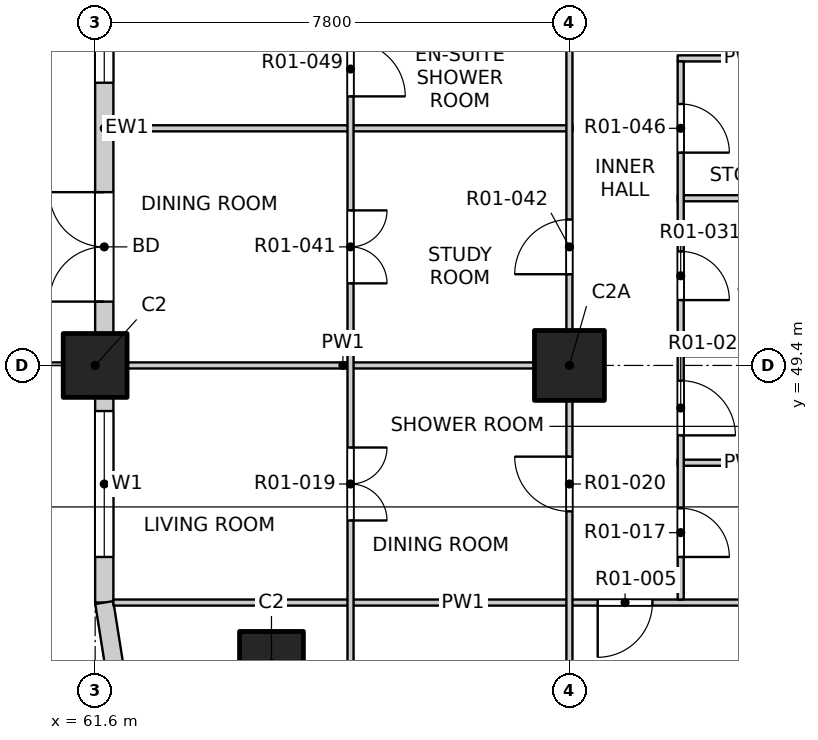
"""IFC4 building model, lengths in metres.
Left out: names, types, materials, properties, quantities, classifications, styles, units other than length and angle.
Written with IfcOpenShell. Run it as: python <this file> out.ifc"""

import sys

from ifc_helpers import new_model, si_unit, direction, frame, frame_2d, origin, origin_2d, place, context, subcontext, project, spatial, rectangle, extrude, element, fill, save


model = new_model("IFC4")
c1 = context("Model", 3, precision=1e-05, world=origin(), true_north=direction((0.0, 1.0)))
c2 = subcontext(c1, "Body", "Model", "MODEL_VIEW")
j1 = project(units=[si_unit("LENGTHUNIT", "METRE"), si_unit("PLANEANGLEUNIT", "RADIAN")], contexts=[c1])
p1 = place(None, origin())
s1 = spatial("IfcSite", under=j1, at=p1, CompositionType="ELEMENT")
p2 = place(p1, origin())
s2 = spatial("IfcBuilding", under=s1, at=p2, CompositionType="ELEMENT")
p3 = place(p2, frame((0.0, 0.0, 26.3)))
s3 = spatial("IfcBuildingStorey", under=s2, at=p3, CompositionType="ELEMENT", Elevation=26.3)
for number, where, z_axis, x_axis in (
    (1, (64.5, 44.5, -0.25), (0.0, 0.0, 1.0), (1.0, 0.0, 0.0)),
    (2, (61.6, 49.4, -0.25), (0.0, 0.0, 1.0), (1.0, 0.0, 0.0)),
):
    element("IfcColumn", number, at=place(p3, frame(where, z_axis=z_axis, x_axis=x_axis)), inside=s3, PredefinedType="COLUMN", context=c2, shape_type="SweptSolid", body=[
        extrude(rectangle(XDim=1.05, YDim=1.05, at=origin_2d()), origin(), (0.0, 0.0, 1.0), 3.4),
    ])
p4 = place(p3, frame((69.4, 49.4, -0.25), z_axis=(0.0, 0.0, 1.0), x_axis=(1.0, 0.0, 0.0)))
e3 = element("IfcColumn", 3, at=p4, inside=s3, PredefinedType="COLUMN", context=c2, shape_type="SweptSolid", body=[
    extrude(rectangle(XDim=1.15, YDim=1.15, at=origin_2d()), origin(), (0.0, 0.0, 1.0), 3.4),
])
p5 = place(p3, frame((61.75, 45.5, 0.0), z_axis=(0.0, 0.0, 1.0), x_axis=(0.0, 1.0, 0.0)))
e4 = element("IfcWall", 4, at=p5, inside=s3, PredefinedType="SOLIDWALL", context=c2, shape_type="SweptSolid", body=[
    extrude(rectangle(XDim=3.375, YDim=0.3, at=frame_2d((1.688, 0.0))), origin(), (0.0, 0.0, 1.0), 2.7),
])
p6 = place(p5, frame((0.75, 0.0, 0.9)))
e5 = element("IfcOpeningElement", 5, at=p6, cuts=e4, PredefinedType="OPENING", context=c2, shape_type="SweptSolid", body=[
    extrude(rectangle(XDim=2.4, YDim=1.8, at=frame_2d((1.2, 0.9))), frame((0.0, 0.16, 0.0), z_axis=(0.0, -1.0, 0.0), x_axis=(1.0, 0.0, 0.0)), (0.0, 0.0, 1.0), 0.32),
])
p7 = place(p3, frame((61.75, 49.925, 0.0), z_axis=(0.0, 0.0, 1.0), x_axis=(0.0, 1.0, 0.0)))
e6 = element("IfcWall", 6, at=p7, inside=s3, PredefinedType="SOLIDWALL", context=c2, shape_type="SweptSolid", body=[
    extrude(rectangle(XDim=6.75, YDim=0.3, at=frame_2d((3.375, 0.0))), origin(), (0.0, 0.0, 1.0), 2.7),
])
p8 = place(p7, frame((0.525, 0.0, 0.0)))
e7 = element("IfcOpeningElement", 7, at=p8, cuts=e6, PredefinedType="OPENING", context=c2, shape_type="SweptSolid", body=[
    extrude(rectangle(XDim=1.8, YDim=2.4, at=frame_2d((0.9, 1.2))), frame((0.0, 0.16, 0.0), z_axis=(0.0, -1.0, 0.0), x_axis=(1.0, 0.0, 0.0)), (0.0, 0.0, 1.0), 0.32),
])
p9 = place(p7, frame((4.125, 0.0, 0.9)))
e8 = element("IfcOpeningElement", 8, at=p9, cuts=e6, PredefinedType="OPENING", context=c2, shape_type="SweptSolid", body=[
    extrude(rectangle(XDim=2.4, YDim=1.8, at=frame_2d((1.2, 0.9))), frame((0.0, 0.16, 0.0), z_axis=(0.0, -1.0, 0.0), x_axis=(1.0, 0.0, 0.0)), (0.0, 0.0, 1.0), 0.32),
])
p10 = place(p3, frame((61.75, 45.5, 0.0), z_axis=(0.0, 0.0, 1.0), x_axis=(0.156496880861, -0.987678452879, 0.0)))
e9 = element("IfcWall", 9, at=p10, inside=s3, PredefinedType="SOLIDWALL", context=c2, shape_type="SweptSolid", body=[
    extrude(rectangle(XDim=1.173, YDim=0.3, at=frame_2d((0.586, 0.0))), origin(), (0.0, 0.0, 1.0), 2.7),
])
p11 = place(p3, frame((61.9, 45.5, 0.0), z_axis=(0.0, 0.0, 1.0), x_axis=(1.0, 0.0, 0.0)))
e10 = element("IfcWall", 10, at=p11, inside=s3, PredefinedType="PARTITIONING", context=c2, shape_type="SweptSolid", body=[
    extrude(rectangle(XDim=11.5, YDim=0.1, at=frame_2d((5.75, 0.0))), origin(), (0.0, 0.0, 1.0), 3.15),
])
p12 = place(p11, frame((7.965, 0.0, 0.0)))
e11 = element("IfcOpeningElement", 11, at=p12, cuts=e10, PredefinedType="OPENING", context=c2, shape_type="SweptSolid", body=[
    extrude(rectangle(XDim=0.9, YDim=2.1, at=frame_2d((0.45, 1.05))), frame((0.0, 0.06, 0.0), z_axis=(0.0, -1.0, 0.0), x_axis=(1.0, 0.0, 0.0)), (0.0, 0.0, 1.0), 0.12),
])
p13 = place(p3, frame((71.18, 47.8, 0.0), z_axis=(0.0, 0.0, 1.0), x_axis=(1.0, 0.0, 0.0)))
e12 = element("IfcWall", 12, at=p13, inside=s3, PredefinedType="PARTITIONING", context=c2, shape_type="SweptSolid", body=[
    extrude(rectangle(XDim=2.22, YDim=0.1, at=frame_2d((1.11, 0.0))), origin(), (0.0, 0.0, 1.0), 3.15),
])
p14 = place(p3, frame((61.9, 49.4, 0.0), z_axis=(0.0, 0.0, 1.0), x_axis=(1.0, 0.0, 0.0)))
e13 = element("IfcWall", 13, at=p14, inside=s3, PredefinedType="PARTITIONING", context=c2, shape_type="SweptSolid", body=[
    extrude(rectangle(XDim=7.55, YDim=0.1, at=frame_2d((3.775, 0.0))), origin(), (0.0, 0.0, 1.0), 2.55),
])
for number, where, z_axis, x_axis in (
    (14, (71.18, 49.6, 0.0), (0.0, 0.0, 1.0), (1.0, 0.0, 0.0)),
    (15, (71.18, 52.15, 0.0), (0.0, 0.0, 1.0), (1.0, 0.0, 0.0)),
):
    element("IfcWall", number, at=place(p3, frame(where, z_axis=z_axis, x_axis=x_axis)), inside=s3, PredefinedType="PARTITIONING", context=c2, shape_type="SweptSolid", body=[
        extrude(rectangle(XDim=2.22, YDim=0.1, at=frame_2d((1.11, 0.0))), origin(), (0.0, 0.0, 1.0), 3.15),
    ])
p15 = place(p3, frame((61.9, 53.3, 0.0), z_axis=(0.0, 0.0, 1.0), x_axis=(1.0, 0.0, 0.0)))
e16 = element("IfcWall", 16, at=p15, inside=s3, PredefinedType="PARTITIONING", context=c2, shape_type="SweptSolid", body=[
    extrude(rectangle(XDim=7.55, YDim=0.1, at=frame_2d((3.775, 0.0))), origin(), (0.0, 0.0, 1.0), 3.15),
])
p16 = place(p3, frame((71.18, 54.45, 0.0), z_axis=(0.0, 0.0, 1.0), x_axis=(1.0, 0.0, 0.0)))
e17 = element("IfcWall", 17, at=p16, inside=s3, PredefinedType="PARTITIONING", context=c2, shape_type="SweptSolid", body=[
    extrude(rectangle(XDim=2.22, YDim=0.1, at=frame_2d((1.11, 0.0))), origin(), (0.0, 0.0, 1.0), 3.15),
])
p17 = place(p3, frame((65.8, 41.9, 0.0), z_axis=(0.0, 0.0, 1.0), x_axis=(0.0, 1.0, 0.0)))
e18 = element("IfcWall", 18, at=p17, inside=s3, PredefinedType="PARTITIONING", context=c2, shape_type="SweptSolid", body=[
    extrude(rectangle(XDim=19.1, YDim=0.1, at=frame_2d((9.55, 0.0))), origin(), (0.0, 0.0, 1.0), 3.15),
])
p18 = place(p17, frame((1.05, 0.0, 0.0)))
e19 = element("IfcOpeningElement", 19, at=p18, cuts=e18, PredefinedType="OPENING", context=c2, shape_type="SweptSolid", body=[
    extrude(rectangle(XDim=1.2, YDim=2.1, at=frame_2d((0.6, 1.05))), frame((0.0, 0.06, 0.0), z_axis=(0.0, -1.0, 0.0), x_axis=(1.0, 0.0, 0.0)), (0.0, 0.0, 1.0), 0.12),
])
p19 = place(p17, frame((4.95, 0.0, 0.0)))
e20 = element("IfcOpeningElement", 20, at=p19, cuts=e18, PredefinedType="OPENING", context=c2, shape_type="SweptSolid", body=[
    extrude(rectangle(XDim=1.2, YDim=2.1, at=frame_2d((0.6, 1.05))), frame((0.0, 0.06, 0.0), z_axis=(0.0, -1.0, 0.0), x_axis=(1.0, 0.0, 0.0)), (0.0, 0.0, 1.0), 0.12),
])
p20 = place(p17, frame((8.85, 0.0, 0.0)))
e21 = element("IfcOpeningElement", 21, at=p20, cuts=e18, PredefinedType="OPENING", context=c2, shape_type="SweptSolid", body=[
    extrude(rectangle(XDim=1.2, YDim=2.1, at=frame_2d((0.6, 1.05))), frame((0.0, 0.06, 0.0), z_axis=(0.0, -1.0, 0.0), x_axis=(1.0, 0.0, 0.0)), (0.0, 0.0, 1.0), 0.12),
])
p21 = place(p17, frame((11.925, 0.0, 0.0)))
e22 = element("IfcOpeningElement", 22, at=p21, cuts=e18, PredefinedType="OPENING", context=c2, shape_type="SweptSolid", body=[
    extrude(rectangle(XDim=0.9, YDim=2.1, at=frame_2d((0.45, 1.05))), frame((0.0, 0.06, 0.0), z_axis=(0.0, -1.0, 0.0), x_axis=(1.0, 0.0, 0.0)), (0.0, 0.0, 1.0), 0.12),
])
p22 = place(p17, frame((13.875, 0.0, 0.0)))
e23 = element("IfcOpeningElement", 23, at=p22, cuts=e18, PredefinedType="OPENING", context=c2, shape_type="SweptSolid", body=[
    extrude(rectangle(XDim=0.9, YDim=2.1, at=frame_2d((0.45, 1.05))), frame((0.0, 0.06, 0.0), z_axis=(0.0, -1.0, 0.0), x_axis=(1.0, 0.0, 0.0)), (0.0, 0.0, 1.0), 0.12),
])
p23 = place(p17, frame((15.825, 0.0, 0.0)))
e24 = element("IfcOpeningElement", 24, at=p23, cuts=e18, PredefinedType="OPENING", context=c2, shape_type="SweptSolid", body=[
    extrude(rectangle(XDim=0.9, YDim=2.1, at=frame_2d((0.45, 1.05))), frame((0.0, 0.06, 0.0), z_axis=(0.0, -1.0, 0.0), x_axis=(1.0, 0.0, 0.0)), (0.0, 0.0, 1.0), 0.12),
])
p24 = place(p17, frame((17.775, 0.0, 0.0)))
e25 = element("IfcOpeningElement", 25, at=p24, cuts=e18, PredefinedType="OPENING", context=c2, shape_type="SweptSolid", body=[
    extrude(rectangle(XDim=0.9, YDim=2.1, at=frame_2d((0.45, 1.05))), frame((0.0, 0.06, 0.0), z_axis=(0.0, -1.0, 0.0), x_axis=(1.0, 0.0, 0.0)), (0.0, 0.0, 1.0), 0.12),
])
p25 = place(p3, frame((69.4, 41.9, 0.0), z_axis=(0.0, 0.0, 1.0), x_axis=(0.0, 1.0, 0.0)))
e26 = element("IfcWall", 26, at=p25, inside=s3, PredefinedType="PARTITIONING", context=c2, shape_type="SweptSolid", body=[
    extrude(rectangle(XDim=7.5, YDim=0.1, at=frame_2d((3.75, 0.0))), origin(), (0.0, 0.0, 1.0), 2.55),
])
p26 = place(p25, frame((1.2, 0.0, 0.0)))
e27 = element("IfcOpeningElement", 27, at=p26, cuts=e26, PredefinedType="OPENING", context=c2, shape_type="SweptSolid", body=[
    extrude(rectangle(XDim=0.9, YDim=2.1, at=frame_2d((0.45, 1.05))), frame((0.0, 0.06, 0.0), z_axis=(0.0, -1.0, 0.0), x_axis=(1.0, 0.0, 0.0)), (0.0, 0.0, 1.0), 0.12),
])
p27 = place(p25, frame((5.1, 0.0, 0.0)))
e28 = element("IfcOpeningElement", 28, at=p27, cuts=e26, PredefinedType="OPENING", context=c2, shape_type="SweptSolid", body=[
    extrude(rectangle(XDim=0.9, YDim=2.1, at=frame_2d((0.45, 1.05))), frame((0.0, 0.06, 0.0), z_axis=(0.0, -1.0, 0.0), x_axis=(1.0, 0.0, 0.0)), (0.0, 0.0, 1.0), 0.12),
])
p28 = place(p3, frame((69.4, 49.4, 0.0), z_axis=(0.0, 0.0, 1.0), x_axis=(0.0, 1.0, 0.0)))
e29 = element("IfcWall", 29, at=p28, inside=s3, PredefinedType="PARTITIONING", context=c2, shape_type="SweptSolid", body=[
    extrude(rectangle(XDim=31.2, YDim=0.1, at=frame_2d((15.6, 0.0))), origin(), (0.0, 0.0, 1.0), 3.15),
])
p29 = place(p28, frame((1.5, 0.0, 0.0)))
e30 = element("IfcOpeningElement", 30, at=p29, cuts=e29, PredefinedType="OPENING", context=c2, shape_type="SweptSolid", body=[
    extrude(rectangle(XDim=0.9, YDim=2.1, at=frame_2d((0.45, 1.05))), frame((0.0, 0.06, 0.0), z_axis=(0.0, -1.0, 0.0), x_axis=(1.0, 0.0, 0.0)), (0.0, 0.0, 1.0), 0.12),
])
p30 = place(p28, frame((6.225, 0.0, 0.0)))
e31 = element("IfcOpeningElement", 31, at=p30, cuts=e29, PredefinedType="OPENING", context=c2, shape_type="SweptSolid", body=[
    extrude(rectangle(XDim=0.9, YDim=2.1, at=frame_2d((0.45, 1.05))), frame((0.0, 0.06, 0.0), z_axis=(0.0, -1.0, 0.0), x_axis=(1.0, 0.0, 0.0)), (0.0, 0.0, 1.0), 0.12),
])
p31 = place(p28, frame((10.275, 0.0, 0.0)))
e32 = element("IfcOpeningElement", 32, at=p31, cuts=e29, PredefinedType="OPENING", context=c2, shape_type="SweptSolid", body=[
    extrude(rectangle(XDim=0.9, YDim=2.1, at=frame_2d((0.45, 1.05))), frame((0.0, 0.06, 0.0), z_axis=(0.0, -1.0, 0.0), x_axis=(1.0, 0.0, 0.0)), (0.0, 0.0, 1.0), 0.12),
])
p32 = place(p28, frame((13.2, 0.0, 0.0)))
e33 = element("IfcOpeningElement", 33, at=p32, cuts=e29, PredefinedType="OPENING", context=c2, shape_type="SweptSolid", body=[
    extrude(rectangle(XDim=0.9, YDim=2.1, at=frame_2d((0.45, 1.05))), frame((0.0, 0.06, 0.0), z_axis=(0.0, -1.0, 0.0), x_axis=(1.0, 0.0, 0.0)), (0.0, 0.0, 1.0), 0.12),
])
p33 = place(p28, frame((18.075, 0.0, 0.0)))
e34 = element("IfcOpeningElement", 34, at=p33, cuts=e29, PredefinedType="OPENING", context=c2, shape_type="SweptSolid", body=[
    extrude(rectangle(XDim=0.9, YDim=2.1, at=frame_2d((0.45, 1.05))), frame((0.0, 0.06, 0.0), z_axis=(0.0, -1.0, 0.0), x_axis=(1.0, 0.0, 0.0)), (0.0, 0.0, 1.0), 0.12),
])
p34 = place(p28, frame((21.8, 0.0, 0.0)))
e35 = element("IfcOpeningElement", 35, at=p34, cuts=e29, PredefinedType="OPENING", context=c2, shape_type="SweptSolid", body=[
    extrude(rectangle(XDim=0.9, YDim=2.1, at=frame_2d((0.45, 1.05))), frame((0.0, 0.06, 0.0), z_axis=(0.0, -1.0, 0.0), x_axis=(1.0, 0.0, 0.0)), (0.0, 0.0, 1.0), 0.12),
])
p35 = place(p28, frame((24.9, 0.0, 0.0)))
e36 = element("IfcOpeningElement", 36, at=p35, cuts=e29, PredefinedType="OPENING", context=c2, shape_type="SweptSolid", body=[
    extrude(rectangle(XDim=0.9, YDim=2.1, at=frame_2d((0.45, 1.05))), frame((0.0, 0.06, 0.0), z_axis=(0.0, -1.0, 0.0), x_axis=(1.0, 0.0, 0.0)), (0.0, 0.0, 1.0), 0.12),
])
p36 = place(p28, frame((29.6, 0.0, 0.0)))
e37 = element("IfcOpeningElement", 37, at=p36, cuts=e29, PredefinedType="OPENING", context=c2, shape_type="SweptSolid", body=[
    extrude(rectangle(XDim=0.9, YDim=2.1, at=frame_2d((0.45, 1.05))), frame((0.0, 0.06, 0.0), z_axis=(0.0, -1.0, 0.0), x_axis=(1.0, 0.0, 0.0)), (0.0, 0.0, 1.0), 0.12),
])
p37 = place(p3, frame((71.23, 45.55, 0.0), z_axis=(0.0, 0.0, 1.0), x_axis=(0.0, 1.0, 0.0)))
e38 = element("IfcWall", 38, at=p37, inside=s3, PredefinedType="PARTITIONING", context=c2, shape_type="SweptSolid", body=[
    extrude(rectangle(XDim=8.85, YDim=0.1, at=frame_2d((4.425, 0.0))), origin(), (0.0, 0.0, 1.0), 3.15),
])
p38 = place(p37, frame((0.7, 0.0, 0.0)))
e39 = element("IfcOpeningElement", 39, at=p38, cuts=e38, PredefinedType="OPENING", context=c2, shape_type="SweptSolid", body=[
    extrude(rectangle(XDim=0.8, YDim=2.1, at=frame_2d((0.4, 1.05))), frame((0.0, 0.06, 0.0), z_axis=(0.0, -1.0, 0.0), x_axis=(1.0, 0.0, 0.0)), (0.0, 0.0, 1.0), 0.12),
])
p39 = place(p37, frame((2.7, 0.0, 0.0)))
e40 = element("IfcOpeningElement", 40, at=p39, cuts=e38, PredefinedType="OPENING", context=c2, shape_type="SweptSolid", body=[
    extrude(rectangle(XDim=0.9, YDim=2.1, at=frame_2d((0.45, 1.05))), frame((0.0, 0.06, 0.0), z_axis=(0.0, -1.0, 0.0), x_axis=(1.0, 0.0, 0.0)), (0.0, 0.0, 1.0), 0.12),
])
p40 = place(p37, frame((4.925, 0.0, 0.0)))
e41 = element("IfcOpeningElement", 41, at=p40, cuts=e38, PredefinedType="OPENING", context=c2, shape_type="SweptSolid", body=[
    extrude(rectangle(XDim=0.8, YDim=2.1, at=frame_2d((0.4, 1.05))), frame((0.0, 0.06, 0.0), z_axis=(0.0, -1.0, 0.0), x_axis=(1.0, 0.0, 0.0)), (0.0, 0.0, 1.0), 0.12),
])
p41 = place(p37, frame((7.35, 0.0, 0.0)))
e42 = element("IfcOpeningElement", 42, at=p41, cuts=e38, PredefinedType="OPENING", context=c2, shape_type="SweptSolid", body=[
    extrude(rectangle(XDim=0.8, YDim=2.1, at=frame_2d((0.4, 1.05))), frame((0.0, 0.06, 0.0), z_axis=(0.0, -1.0, 0.0), x_axis=(1.0, 0.0, 0.0)), (0.0, 0.0, 1.0), 0.12),
])
p42 = place(p6, origin())
e43 = element("IfcWindow", 43, at=p42, inside=s3, PartitioningType="DOUBLE_PANEL_VERTICAL", PredefinedType="WINDOW", context=c2, shape_type="SweptSolid", body=[
    extrude(rectangle(XDim=2.4, YDim=1.8, at=frame_2d((1.2, 0.9))), frame((0.0, 0.03, 0.0), z_axis=(0.0, -1.0, 0.0), x_axis=(1.0, 0.0, 0.0)), (0.0, 0.0, 1.0), 0.06),
])
fill(e5, e43)
p43 = place(p8, origin())
e44 = element("IfcDoor", 44, at=p43, inside=s3, OperationType="DOUBLE_DOOR_SINGLE_SWING", PredefinedType="DOOR", context=c2, shape_type="SweptSolid", body=[
    extrude(rectangle(XDim=1.8, YDim=2.4, at=frame_2d((0.9, 1.2))), frame((0.0, 0.025, 0.0), z_axis=(0.0, -1.0, 0.0), x_axis=(1.0, 0.0, 0.0)), (0.0, 0.0, 1.0), 0.05),
])
fill(e7, e44)
p44 = place(p9, origin())
e45 = element("IfcWindow", 45, at=p44, inside=s3, PartitioningType="DOUBLE_PANEL_VERTICAL", PredefinedType="WINDOW", context=c2, shape_type="SweptSolid", body=[
    extrude(rectangle(XDim=2.4, YDim=1.8, at=frame_2d((1.2, 0.9))), frame((0.0, 0.03, 0.0), z_axis=(0.0, -1.0, 0.0), x_axis=(1.0, 0.0, 0.0)), (0.0, 0.0, 1.0), 0.06),
])
fill(e8, e45)
p45 = place(p12, origin())
e46 = element("IfcDoor", 46, at=p45, inside=s3, OperationType="SINGLE_SWING_RIGHT", PredefinedType="DOOR", context=c2, shape_type="SweptSolid", body=[
    extrude(rectangle(XDim=0.9, YDim=2.1, at=frame_2d((0.45, 1.05))), frame((0.0, 0.025, 0.0), z_axis=(0.0, -1.0, 0.0), x_axis=(1.0, 0.0, 0.0)), (0.0, 0.0, 1.0), 0.05),
])
fill(e11, e46)
p46 = place(p38, origin())
e47 = element("IfcDoor", 47, at=p46, inside=s3, OperationType="SINGLE_SWING_RIGHT", PredefinedType="DOOR", context=c2, shape_type="SweptSolid", body=[
    extrude(rectangle(XDim=0.8, YDim=2.1, at=frame_2d((0.4, 1.05))), frame((0.0, 0.025, 0.0), z_axis=(0.0, -1.0, 0.0), x_axis=(1.0, 0.0, 0.0)), (0.0, 0.0, 1.0), 0.05),
])
fill(e39, e47)
p47 = place(p19, origin())
e48 = element("IfcDoor", 48, at=p47, inside=s3, OperationType="DOUBLE_DOOR_SINGLE_SWING", PredefinedType="DOOR", context=c2, shape_type="SweptSolid", body=[
    extrude(rectangle(XDim=1.2, YDim=2.1, at=frame_2d((0.6, 1.05))), frame((0.0, 0.025, 0.0), z_axis=(0.0, -1.0, 0.0), x_axis=(1.0, 0.0, 0.0)), (0.0, 0.0, 1.0), 0.05),
])
fill(e20, e48)
p48 = place(p27, origin())
e49 = element("IfcDoor", 49, at=p48, inside=s3, OperationType="SINGLE_SWING_RIGHT", PredefinedType="DOOR", context=c2, shape_type="SweptSolid", body=[
    extrude(rectangle(XDim=0.9, YDim=2.1, at=frame_2d((0.45, 1.05))), frame((0.0, 0.025, 0.0), z_axis=(0.0, -1.0, 0.0), x_axis=(1.0, 0.0, 0.0)), (0.0, 0.0, 1.0), 0.05),
])
fill(e28, e49)
p49 = place(p39, origin())
e50 = element("IfcDoor", 50, at=p49, inside=s3, OperationType="SINGLE_SWING_RIGHT", PredefinedType="DOOR", context=c2, shape_type="SweptSolid", body=[
    extrude(rectangle(XDim=0.9, YDim=2.1, at=frame_2d((0.45, 1.05))), frame((0.0, 0.025, 0.0), z_axis=(0.0, -1.0, 0.0), x_axis=(1.0, 0.0, 0.0)), (0.0, 0.0, 1.0), 0.05),
])
fill(e40, e50)
p50 = place(p40, origin())
e51 = element("IfcDoor", 51, at=p50, inside=s3, OperationType="SINGLE_SWING_RIGHT", PredefinedType="DOOR", context=c2, shape_type="SweptSolid", body=[
    extrude(rectangle(XDim=0.8, YDim=2.1, at=frame_2d((0.4, 1.05))), frame((0.0, 0.025, 0.0), z_axis=(0.0, -1.0, 0.0), x_axis=(1.0, 0.0, 0.0)), (0.0, 0.0, 1.0), 0.05),
])
fill(e41, e51)
p51 = place(p20, origin())
e52 = element("IfcDoor", 52, at=p51, inside=s3, OperationType="DOUBLE_DOOR_SINGLE_SWING", PredefinedType="DOOR", context=c2, shape_type="SweptSolid", body=[
    extrude(rectangle(XDim=1.2, YDim=2.1, at=frame_2d((0.6, 1.05))), frame((0.0, 0.025, 0.0), z_axis=(0.0, -1.0, 0.0), x_axis=(1.0, 0.0, 0.0)), (0.0, 0.0, 1.0), 0.05),
])
fill(e21, e52)
p52 = place(p29, origin())
e53 = element("IfcDoor", 53, at=p52, inside=s3, OperationType="SINGLE_SWING_LEFT", PredefinedType="DOOR", context=c2, shape_type="SweptSolid", body=[
    extrude(rectangle(XDim=0.9, YDim=2.1, at=frame_2d((0.45, 1.05))), frame((0.0, 0.025, 0.0), z_axis=(0.0, -1.0, 0.0), x_axis=(1.0, 0.0, 0.0)), (0.0, 0.0, 1.0), 0.05),
])
fill(e30, e53)
p53 = place(p41, origin())
e54 = element("IfcDoor", 54, at=p53, inside=s3, OperationType="SINGLE_SWING_RIGHT", PredefinedType="DOOR", context=c2, shape_type="SweptSolid", body=[
    extrude(rectangle(XDim=0.8, YDim=2.1, at=frame_2d((0.4, 1.05))), frame((0.0, 0.025, 0.0), z_axis=(0.0, -1.0, 0.0), x_axis=(1.0, 0.0, 0.0)), (0.0, 0.0, 1.0), 0.05),
])
fill(e42, e54)
p54 = place(p21, origin())
e55 = element("IfcDoor", 55, at=p54, inside=s3, OperationType="SINGLE_SWING_RIGHT", PredefinedType="DOOR", context=c2, shape_type="SweptSolid", body=[
    extrude(rectangle(XDim=0.9, YDim=2.1, at=frame_2d((0.45, 1.05))), frame((0.0, 0.025, 0.0), z_axis=(0.0, -1.0, 0.0), x_axis=(1.0, 0.0, 0.0)), (0.0, 0.0, 1.0), 0.05),
])
fill(e22, e55)
save(model, sys.argv[1])
